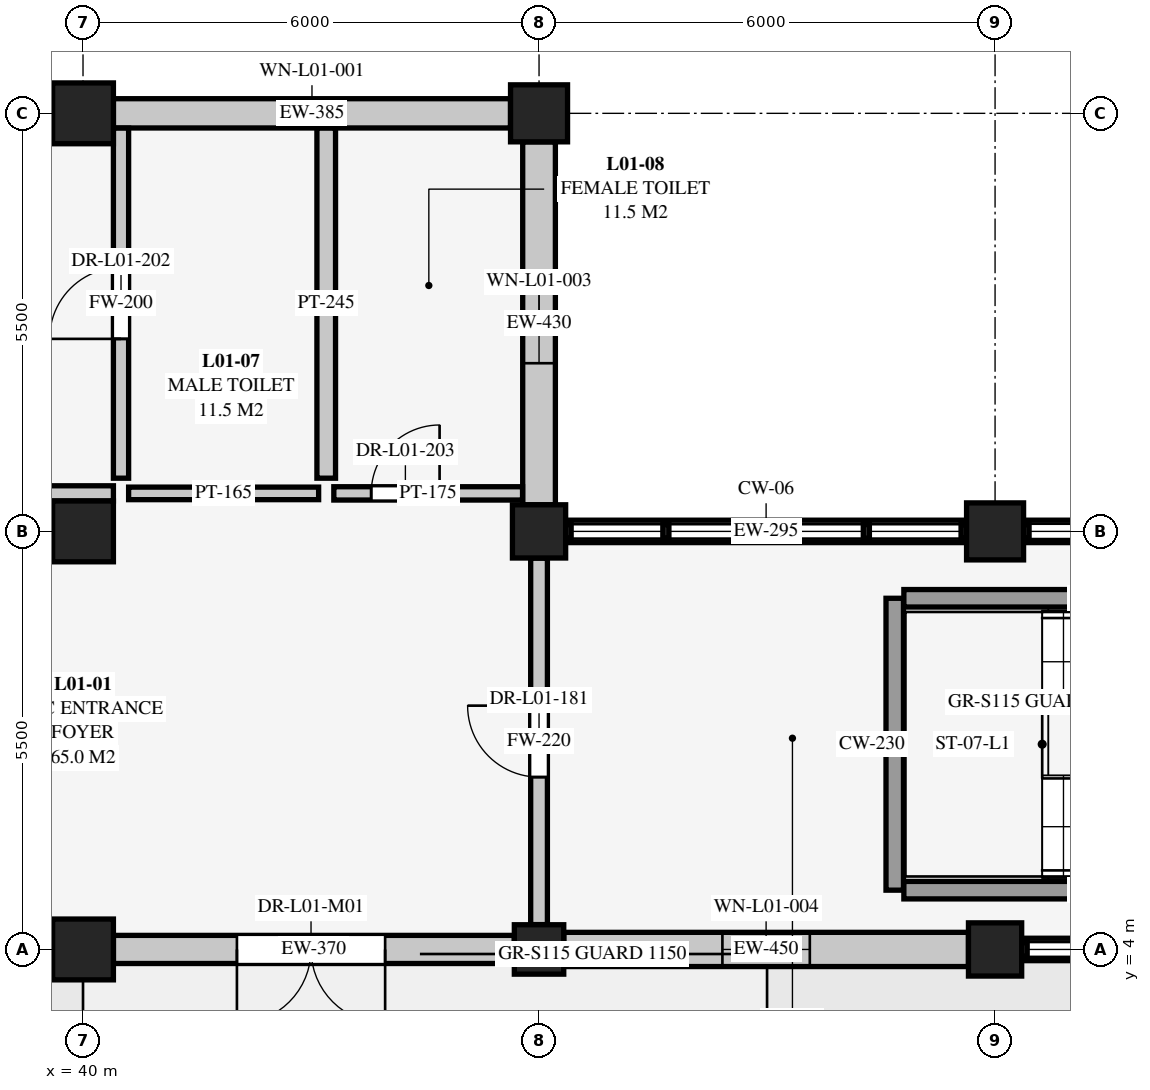
"""IFC4 building model, lengths in metres.
Left out: names, types, materials, properties, quantities, classifications, styles, units other than length and angle.
Written with IfcOpenShell. Run it as: python <this file> out.ifc"""

import sys

from ifc_helpers import new_model, si_unit, direction, frame, frame_2d, origin, origin_2d, place, context, subcontext, project, spatial, rectangle, extrude, element, fill, save


model = new_model("IFC4")
c1 = context("Model", 3, precision=1e-05, world=origin(), true_north=direction((0.0, 1.0)))
c2 = subcontext(c1, "Body", "Model", "MODEL_VIEW")
j1 = project(units=[si_unit("LENGTHUNIT", "METRE"), si_unit("PLANEANGLEUNIT", "RADIAN")], contexts=[c1])
p1 = place(None, origin())
s1 = spatial("IfcSite", under=j1, at=p1, CompositionType="ELEMENT")
p2 = place(p1, origin())
s2 = spatial("IfcBuilding", under=s1, at=p2, CompositionType="ELEMENT")
p3 = place(p2, origin())
s3 = spatial("IfcBuildingStorey", under=s2, at=p3, CompositionType="ELEMENT", Elevation=0.0)
for number, where, z_axis, x_axis in (
    (1, (40.0, 4.0, 0.0), (0.0, 0.0, 1.0), (1.0, 0.0, 0.0)),
    (2, (40.0, 9.5, 0.0), (0.0, 0.0, 1.0), (1.0, 0.0, 0.0)),
    (3, (40.0, 15.0, 0.0), (0.0, 0.0, 1.0), (1.0, 0.0, 0.0)),
):
    element("IfcColumn", number, at=place(p3, frame(where, z_axis=z_axis, x_axis=x_axis)), inside=s3, PredefinedType="COLUMN", context=c2, shape_type="SweptSolid", body=[
        extrude(rectangle(XDim=0.8, YDim=0.8, at=origin_2d()), origin(), (0.0, 0.0, 1.0), 4.5),
    ])
p4 = place(p3, frame((46.0, 4.0, 0.0), z_axis=(0.0, 0.0, 1.0), x_axis=(1.0, 0.0, 0.0)))
e4 = element("IfcColumn", 4, at=p4, inside=s3, PredefinedType="COLUMN", context=c2, shape_type="SweptSolid", body=[
    extrude(rectangle(XDim=0.65, YDim=0.65, at=origin_2d()), origin(), (0.0, 0.0, 1.0), 4.5),
])
p5 = place(p3, frame((46.0, 9.5, 0.0), z_axis=(0.0, 0.0, 1.0), x_axis=(1.0, 0.0, 0.0)))
e5 = element("IfcColumn", 5, at=p5, inside=s3, PredefinedType="COLUMN", context=c2, shape_type="SweptSolid", body=[
    extrude(rectangle(XDim=0.7, YDim=0.7, at=origin_2d()), origin(), (0.0, 0.0, 1.0), 4.5),
])
p6 = place(p3, frame((46.0, 15.0, 0.0), z_axis=(0.0, 0.0, 1.0), x_axis=(1.0, 0.0, 0.0)))
e6 = element("IfcColumn", 6, at=p6, inside=s3, PredefinedType="COLUMN", context=c2, shape_type="SweptSolid", body=[
    extrude(rectangle(XDim=0.75, YDim=0.75, at=origin_2d()), origin(), (0.0, 0.0, 1.0), 4.5),
])
p7 = place(p3, frame((52.0, 4.0, 0.0), z_axis=(0.0, 0.0, 1.0), x_axis=(1.0, 0.0, 0.0)))
e7 = element("IfcColumn", 7, at=p7, inside=s3, PredefinedType="COLUMN", context=c2, shape_type="SweptSolid", body=[
    extrude(rectangle(XDim=0.7, YDim=0.7, at=origin_2d()), origin(), (0.0, 0.0, 1.0), 4.5),
])
p8 = place(p3, frame((52.0, 9.5, 0.0), z_axis=(0.0, 0.0, 1.0), x_axis=(1.0, 0.0, 0.0)))
e8 = element("IfcColumn", 8, at=p8, inside=s3, PredefinedType="COLUMN", context=c2, shape_type="SweptSolid", body=[
    extrude(rectangle(XDim=0.75, YDim=0.75, at=origin_2d()), origin(), (0.0, 0.0, 1.0), 4.5),
])
p9 = place(p3, frame((45.675, 4.0, 0.0), z_axis=(0.0, 0.0, 1.0), x_axis=(-1.0, 0.0, 0.0)))
e9 = element("IfcWall", 9, at=p9, inside=s3, PredefinedType="SOLIDWALL", context=c2, shape_type="SweptSolid", body=[
    extrude(rectangle(XDim=5.275, YDim=0.37, at=frame_2d((2.638, 0.0))), origin(), (0.0, 0.0, 1.0), 3.869),
])
p10 = place(p9, frame((1.7, 0.0, 0.0)))
e10 = element("IfcOpeningElement", 10, at=p10, cuts=e9, PredefinedType="OPENING", context=c2, shape_type="SweptSolid", body=[
    extrude(rectangle(XDim=1.95, YDim=2.3, at=frame_2d((0.975, 1.15))), frame((0.0, 0.195, 0.0), z_axis=(0.0, -1.0, 0.0), x_axis=(1.0, 0.0, 0.0)), (0.0, 0.0, 1.0), 0.39),
])
p11 = place(p3, frame((40.4, 15.0, 0.0), z_axis=(0.0, 0.0, 1.0), x_axis=(1.0, 0.0, 0.0)))
e11 = element("IfcWall", 11, at=p11, inside=s3, PredefinedType="SOLIDWALL", context=c2, shape_type="SweptSolid", body=[
    extrude(rectangle(XDim=5.225, YDim=0.385, at=frame_2d((2.613, 0.0))), origin(), (0.0, 0.0, 1.0), 3.881),
])
p12 = place(p11, frame((2.188, 0.0, 0.9)))
e12 = element("IfcOpeningElement", 12, at=p12, cuts=e11, PredefinedType="OPENING", context=c2, shape_type="SweptSolid", body=[
    extrude(rectangle(XDim=0.85, YDim=1.95, at=frame_2d((0.425, 0.975))), frame((0.0, 0.202, 0.0), z_axis=(0.0, -1.0, 0.0), x_axis=(1.0, 0.0, 0.0)), (0.0, 0.0, 1.0), 0.405),
])
p13 = place(p3, frame((46.0, 14.625, 0.0), z_axis=(0.0, 0.0, 1.0), x_axis=(0.0, -1.0, 0.0)))
e13 = element("IfcWall", 13, at=p13, inside=s3, PredefinedType="SOLIDWALL", context=c2, shape_type="SweptSolid", body=[
    extrude(rectangle(XDim=4.775, YDim=0.43, at=frame_2d((2.387, 0.0))), origin(), (0.0, 0.0, 1.0), 3.869),
])
p14 = place(p13, frame((1.863, 0.0, 0.85)))
e14 = element("IfcOpeningElement", 14, at=p14, cuts=e13, PredefinedType="OPENING", context=c2, shape_type="SweptSolid", body=[
    extrude(rectangle(XDim=1.05, YDim=2.05, at=frame_2d((0.525, 1.025))), frame((0.0, 0.225, 0.0), z_axis=(0.0, -1.0, 0.0), x_axis=(1.0, 0.0, 0.0)), (0.0, 0.0, 1.0), 0.45),
])
p15 = place(p3, frame((51.65, 4.0, 0.0), z_axis=(0.0, 0.0, 1.0), x_axis=(-1.0, 0.0, 0.0)))
e15 = element("IfcWall", 15, at=p15, inside=s3, PredefinedType="SOLIDWALL", context=c2, shape_type="SweptSolid", body=[
    extrude(rectangle(XDim=5.325, YDim=0.45, at=frame_2d((2.663, 0.0))), origin(), (0.0, 0.0, 1.0), 3.869),
])
p16 = place(p15, frame((2.087, 0.0, 0.85)))
e16 = element("IfcOpeningElement", 16, at=p16, cuts=e15, PredefinedType="OPENING", context=c2, shape_type="SweptSolid", body=[
    extrude(rectangle(XDim=1.15, YDim=2.05, at=frame_2d((0.575, 1.025))), frame((0.0, 0.235, 0.0), z_axis=(0.0, -1.0, 0.0), x_axis=(1.0, 0.0, 0.0)), (0.0, 0.0, 1.0), 0.47),
])
p17 = place(p3, frame((46.35, 9.5, 0.0), z_axis=(0.0, 0.0, 1.0), x_axis=(1.0, 0.0, 0.0)))
e17 = element("IfcWall", 17, at=p17, inside=s3, PredefinedType="SOLIDWALL", context=c2, shape_type="SweptSolid", body=[
    extrude(rectangle(XDim=5.275, YDim=0.295, at=frame_2d((2.637, 0.0))), origin(), (0.0, 0.0, 1.0), 0.41),
])
p18 = place(p3, frame((57.675, 4.0, 0.0), z_axis=(0.0, 0.0, 1.0), x_axis=(-1.0, 0.0, 0.0)))
e18 = element("IfcWall", 18, at=p18, inside=s3, PredefinedType="SOLIDWALL", context=c2, shape_type="SweptSolid", body=[
    extrude(rectangle(XDim=5.325, YDim=0.295, at=frame_2d((2.663, 0.0))), origin(), (0.0, 0.0, 1.0), 0.46),
])
p19 = place(p3, frame((52.375, 9.5, 0.0), z_axis=(0.0, 0.0, 1.0), x_axis=(1.0, 0.0, 0.0)))
e19 = element("IfcWall", 19, at=p19, inside=s3, PredefinedType="SOLIDWALL", context=c2, shape_type="SweptSolid", body=[
    extrude(rectangle(XDim=5.275, YDim=0.295, at=frame_2d((2.637, 0.0))), origin(), (0.0, 0.0, 1.0), 0.52),
])
p20 = place(p3, frame((50.68, 4.78, 0.0), z_axis=(0.0, 0.0, 1.0), x_axis=(0.0, 1.0, 0.0)))
e20 = element("IfcWall", 20, at=p20, inside=s3, PredefinedType="SHEAR", context=c2, shape_type="SweptSolid", body=[
    extrude(rectangle(XDim=3.84, YDim=0.23, at=frame_2d((1.92, 0.0))), origin(), (0.0, 0.0, 1.0), 4.276),
])
for number, where, z_axis, x_axis in (
    (21, (50.8, 4.78, 0.0), (0.0, 0.0, 1.0), (1.0, 0.0, 0.0)),
    (22, (50.8, 8.62, 0.0), (0.0, 0.0, 1.0), (1.0, 0.0, 0.0)),
):
    element("IfcWall", number, at=place(p3, frame(where, z_axis=z_axis, x_axis=x_axis)), inside=s3, PredefinedType="SHEAR", context=c2, shape_type="SweptSolid", body=[
        extrude(rectangle(XDim=5.24, YDim=0.23, at=frame_2d((2.62, 0.0))), origin(), (0.0, 0.0, 1.0), 4.276),
    ])
p21 = place(p3, frame((34.2, 10.0, 0.0), z_axis=(0.0, 0.0, 1.0), x_axis=(1.0, 0.0, 0.0)))
e23 = element("IfcWall", 23, at=p21, inside=s3, PredefinedType="SOLIDWALL", context=c2, shape_type="SweptSolid", body=[
    extrude(rectangle(XDim=6.2, YDim=0.2, at=frame_2d((3.1, 0.0))), origin(), (0.0, 0.0, 1.0), 4.288),
])
p22 = place(p21, frame((2.63, 0.0, 0.0)))
e24 = element("IfcOpeningElement", 24, at=p22, cuts=e23, PredefinedType="OPENING", context=c2, shape_type="SweptSolid", body=[
    extrude(rectangle(XDim=0.94, YDim=2.1, at=frame_2d((0.47, 1.05))), frame((0.0, 0.11, 0.0), z_axis=(0.0, -1.0, 0.0), x_axis=(1.0, 0.0, 0.0)), (0.0, 0.0, 1.0), 0.22),
])
p23 = place(p3, frame((40.6, 10.0, 0.0), z_axis=(0.0, 0.0, 1.0), x_axis=(1.0, 0.0, 0.0)))
e25 = element("IfcWall", 25, at=p23, inside=s3, PredefinedType="PARTITIONING", context=c2, shape_type="SweptSolid", body=[
    extrude(rectangle(XDim=2.5, YDim=0.165, at=frame_2d((1.25, 0.0))), origin(), (0.0, 0.0, 1.0), 4.288),
])
p24 = place(p3, frame((43.3, 10.0, 0.0), z_axis=(0.0, 0.0, 1.0), x_axis=(1.0, 0.0, 0.0)))
e26 = element("IfcWall", 26, at=p24, inside=s3, PredefinedType="PARTITIONING", context=c2, shape_type="SweptSolid", body=[
    extrude(rectangle(XDim=2.483, YDim=0.175, at=frame_2d((1.241, 0.0))), origin(), (0.0, 0.0, 1.0), 4.288),
])
p25 = place(p24, frame((0.491, 0.0, 0.0)))
e27 = element("IfcOpeningElement", 27, at=p25, cuts=e26, PredefinedType="OPENING", context=c2, shape_type="SweptSolid", body=[
    extrude(rectangle(XDim=0.9, YDim=2.1, at=frame_2d((0.45, 1.05))), frame((0.0, 0.097, 0.0), z_axis=(0.0, -1.0, 0.0), x_axis=(1.0, 0.0, 0.0)), (0.0, 0.0, 1.0), 0.195),
])
p26 = place(p3, frame((46.0, 4.327, 0.0), z_axis=(0.0, 0.0, 1.0), x_axis=(0.0, 1.0, 0.0)))
e28 = element("IfcWall", 28, at=p26, inside=s3, PredefinedType="SOLIDWALL", context=c2, shape_type="SweptSolid", body=[
    extrude(rectangle(XDim=4.821, YDim=0.22, at=frame_2d((2.411, 0.0))), origin(), (0.0, 0.0, 1.0), 3.922),
])
p27 = place(p26, frame((1.94, 0.0, 0.0)))
e29 = element("IfcOpeningElement", 29, at=p27, cuts=e28, PredefinedType="OPENING", context=c2, shape_type="SweptSolid", body=[
    extrude(rectangle(XDim=0.94, YDim=2.1, at=frame_2d((0.47, 1.05))), frame((0.0, 0.12, 0.0), z_axis=(0.0, -1.0, 0.0), x_axis=(1.0, 0.0, 0.0)), (0.0, 0.0, 1.0), 0.24),
])
p28 = place(p3, frame((40.5, 10.2, 0.0), z_axis=(0.0, 0.0, 1.0), x_axis=(0.0, 1.0, 0.0)))
e30 = element("IfcWall", 30, at=p28, inside=s3, PredefinedType="SOLIDWALL", context=c2, shape_type="SweptSolid", body=[
    extrude(rectangle(XDim=4.605, YDim=0.2, at=frame_2d((2.303, 0.0))), origin(), (0.0, 0.0, 1.0), 4.288),
])
p29 = place(p28, frame((1.833, 0.0, 0.0)))
e31 = element("IfcOpeningElement", 31, at=p29, cuts=e30, PredefinedType="OPENING", context=c2, shape_type="SweptSolid", body=[
    extrude(rectangle(XDim=0.94, YDim=2.1, at=frame_2d((0.47, 1.05))), frame((0.0, 0.11, 0.0), z_axis=(0.0, -1.0, 0.0), x_axis=(1.0, 0.0, 0.0)), (0.0, 0.0, 1.0), 0.22),
])
p30 = place(p3, frame((43.2, 10.2, 0.0), z_axis=(0.0, 0.0, 1.0), x_axis=(0.0, 1.0, 0.0)))
e32 = element("IfcWall", 32, at=p30, inside=s3, PredefinedType="PARTITIONING", context=c2, shape_type="SweptSolid", body=[
    extrude(rectangle(XDim=4.605, YDim=0.245, at=frame_2d((2.303, 0.0))), origin(), (0.0, 0.0, 1.0), 4.288),
])
p31 = place(p10, origin())
e33 = element("IfcDoor", 33, at=p31, inside=s3, OperationType="DOUBLE_DOOR_SINGLE_SWING", PredefinedType="DOOR", context=c2, shape_type="SweptSolid", body=[
    extrude(rectangle(XDim=1.95, YDim=2.3, at=frame_2d((0.975, 1.15))), frame((0.0, 0.025, 0.0), z_axis=(0.0, -1.0, 0.0), x_axis=(1.0, 0.0, 0.0)), (0.0, 0.0, 1.0), 0.05),
])
fill(e10, e33)
p32 = place(p12, origin())
e34 = element("IfcWindow", 34, at=p32, inside=s3, PartitioningType="SINGLE_PANEL", PredefinedType="WINDOW", context=c2, shape_type="SweptSolid", body=[
    extrude(rectangle(XDim=0.85, YDim=1.95, at=frame_2d((0.425, 0.975))), frame((0.0, 0.03, 0.0), z_axis=(0.0, -1.0, 0.0), x_axis=(1.0, 0.0, 0.0)), (0.0, 0.0, 1.0), 0.06),
])
fill(e12, e34)
p33 = place(p14, origin())
e35 = element("IfcWindow", 35, at=p33, inside=s3, PartitioningType="SINGLE_PANEL", PredefinedType="WINDOW", context=c2, shape_type="SweptSolid", body=[
    extrude(rectangle(XDim=1.05, YDim=2.05, at=frame_2d((0.525, 1.025))), frame((0.0, 0.03, 0.0), z_axis=(0.0, -1.0, 0.0), x_axis=(1.0, 0.0, 0.0)), (0.0, 0.0, 1.0), 0.06),
])
fill(e14, e35)
p34 = place(p16, origin())
e36 = element("IfcWindow", 36, at=p34, inside=s3, PartitioningType="SINGLE_PANEL", PredefinedType="WINDOW", context=c2, shape_type="SweptSolid", body=[
    extrude(rectangle(XDim=1.15, YDim=2.05, at=frame_2d((0.575, 1.025))), frame((0.0, 0.03, 0.0), z_axis=(0.0, -1.0, 0.0), x_axis=(1.0, 0.0, 0.0)), (0.0, 0.0, 1.0), 0.06),
])
fill(e16, e36)
p35 = place(p27, origin())
e37 = element("IfcDoor", 37, at=p35, inside=s3, OperationType="SINGLE_SWING_RIGHT", PredefinedType="DOOR", context=c2, shape_type="SweptSolid", body=[
    extrude(rectangle(XDim=0.94, YDim=2.1, at=frame_2d((0.47, 1.05))), frame((0.0, 0.025, 0.0), z_axis=(0.0, -1.0, 0.0), x_axis=(1.0, 0.0, 0.0)), (0.0, 0.0, 1.0), 0.05),
])
fill(e29, e37)
p36 = place(p29, origin())
e38 = element("IfcDoor", 38, at=p36, inside=s3, OperationType="SINGLE_SWING_LEFT", PredefinedType="DOOR", context=c2, shape_type="SweptSolid", body=[
    extrude(rectangle(XDim=0.94, YDim=2.1, at=frame_2d((0.47, 1.05))), frame((0.0, 0.025, 0.0), z_axis=(0.0, -1.0, 0.0), x_axis=(1.0, 0.0, 0.0)), (0.0, 0.0, 1.0), 0.05),
])
fill(e31, e38)
p37 = place(p25, origin())
e39 = element("IfcDoor", 39, at=p37, inside=s3, OperationType="SINGLE_SWING_RIGHT", PredefinedType="DOOR", context=c2, shape_type="SweptSolid", body=[
    extrude(rectangle(XDim=0.9, YDim=2.1, at=frame_2d((0.45, 1.05))), frame((0.0, 0.025, 0.0), z_axis=(0.0, -1.0, 0.0), x_axis=(1.0, 0.0, 0.0)), (0.0, 0.0, 1.0), 0.05),
])
fill(e27, e39)
save(model, sys.argv[1])
